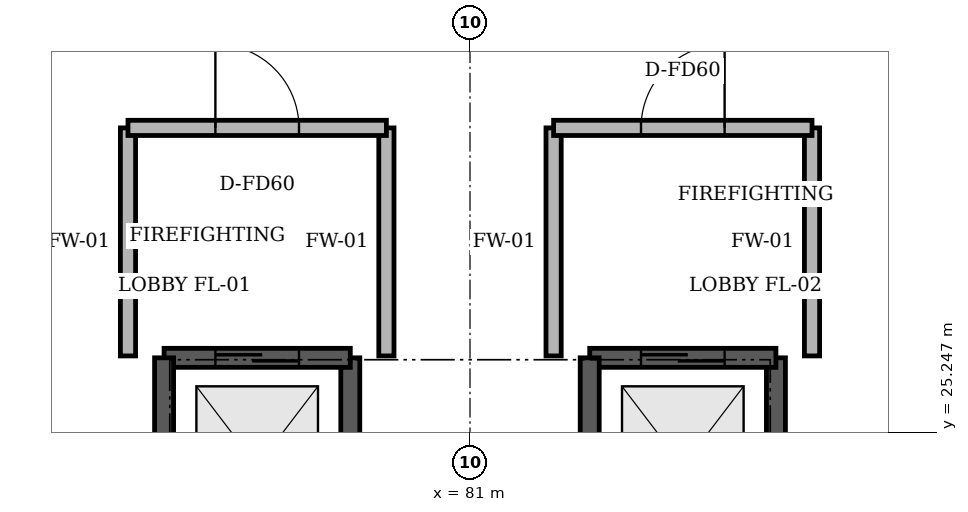
"""IFC4 building model, lengths in metres.
Left out: names, types, materials, properties, quantities, classifications, styles, units other than length and angle.
Written with IfcOpenShell. Run it as: python <this file> out.ifc"""

import sys

from ifc_helpers import new_model, si_unit, direction, frame, frame_2d, origin, place, context, subcontext, project, spatial, rectangle, extrude, element, fill, save


model = new_model("IFC4")
c1 = context("Model", 3, precision=1e-05, world=origin(), true_north=direction((0.0, 1.0)))
c2 = subcontext(c1, "Body", "Model", "MODEL_VIEW")
j1 = project(units=[si_unit("LENGTHUNIT", "METRE"), si_unit("PLANEANGLEUNIT", "RADIAN")], contexts=[c1])
p1 = place(None, origin())
s1 = spatial("IfcSite", under=j1, at=p1, CompositionType="ELEMENT")
p2 = place(p1, origin())
s2 = spatial("IfcBuilding", under=s1, at=p2, CompositionType="ELEMENT")
p3 = place(p2, frame((0.0, 0.0, -4.8)))
s3 = spatial("IfcBuildingStorey", under=s2, at=p3, CompositionType="ELEMENT", Elevation=-4.8)
p4 = place(p3, frame((79.425, 23.375, -0.35), z_axis=(0.0, 0.0, 1.0), x_axis=(0.0, 1.0, 0.0)))
e1 = element("IfcWall", 1, at=p4, inside=s3, PredefinedType="SOLIDWALL", context=c2, shape_type="SweptSolid", body=[
    extrude(rectangle(XDim=2.85, YDim=0.25, at=frame_2d((1.425, 0.0))), origin(), (0.0, 0.0, 1.0), 5.15),
])
p5 = place(p3, frame((79.425, 26.225, -0.35), z_axis=(0.0, 0.0, 1.0), x_axis=(-1.0, 0.0, 0.0)))
e2 = element("IfcWall", 2, at=p5, inside=s3, PredefinedType="SOLIDWALL", context=c2, shape_type="SweptSolid", body=[
    extrude(rectangle(XDim=2.45, YDim=0.25, at=frame_2d((1.225, 0.0))), origin(), (0.0, 0.0, 1.0), 5.15),
])
p6 = place(p5, frame((0.675, 0.0, 0.35)))
e3 = element("IfcOpeningElement", 3, at=p6, cuts=e2, PredefinedType="OPENING", context=c2, shape_type="SweptSolid", body=[
    extrude(rectangle(XDim=1.1, YDim=2.2, at=frame_2d((0.55, 1.1))), frame((0.0, 0.135, 0.0), z_axis=(0.0, -1.0, 0.0), x_axis=(1.0, 0.0, 0.0)), (0.0, 0.0, 1.0), 0.27),
])
p7 = place(p3, frame((76.975, 26.225, -0.35), z_axis=(0.0, 0.0, 1.0), x_axis=(0.0, -1.0, 0.0)))
e4 = element("IfcWall", 4, at=p7, inside=s3, PredefinedType="SOLIDWALL", context=c2, shape_type="SweptSolid", body=[
    extrude(rectangle(XDim=2.85, YDim=0.25, at=frame_2d((1.425, 0.0))), origin(), (0.0, 0.0, 1.0), 5.15),
])
p8 = place(p3, frame((76.5, 26.25, 0.0), z_axis=(0.0, 0.0, 1.0), x_axis=(0.0, 1.0, 0.0)))
e5 = element("IfcWall", 5, at=p8, inside=s3, PredefinedType="SOLIDWALL", context=c2, shape_type="SweptSolid", body=[
    extrude(rectangle(XDim=3.0, YDim=0.2, at=frame_2d((1.5, 0.0))), origin(), (0.0, 0.0, 1.0), 3.564),
])
p9 = place(p3, frame((79.9, 26.25, 0.0), z_axis=(0.0, 0.0, 1.0), x_axis=(0.0, 1.0, 0.0)))
e6 = element("IfcWall", 6, at=p9, inside=s3, PredefinedType="SOLIDWALL", context=c2, shape_type="SweptSolid", body=[
    extrude(rectangle(XDim=3.0, YDim=0.2, at=frame_2d((1.5, 0.0))), origin(), (0.0, 0.0, 1.0), 3.97),
])
p10 = place(p3, frame((76.5, 29.25, 0.0), z_axis=(0.0, 0.0, 1.0), x_axis=(1.0, 0.0, 0.0)))
e7 = element("IfcWall", 7, at=p10, inside=s3, PredefinedType="SOLIDWALL", context=c2, shape_type="SweptSolid", body=[
    extrude(rectangle(XDim=3.4, YDim=0.2, at=frame_2d((1.7, 0.0))), origin(), (0.0, 0.0, 1.0), 3.564),
])
p11 = place(p10, frame((1.15, 0.0, 0.0)))
e8 = element("IfcOpeningElement", 8, at=p11, cuts=e7, PredefinedType="OPENING", context=c2, shape_type="SweptSolid", body=[
    extrude(rectangle(XDim=1.1, YDim=2.2, at=frame_2d((0.55, 1.1))), frame((0.0, 0.11, 0.0), z_axis=(0.0, -1.0, 0.0), x_axis=(1.0, 0.0, 0.0)), (0.0, 0.0, 1.0), 0.22),
])
p12 = place(p3, frame((85.025, 23.375, -0.35), z_axis=(0.0, 0.0, 1.0), x_axis=(0.0, 1.0, 0.0)))
e9 = element("IfcWall", 9, at=p12, inside=s3, PredefinedType="SOLIDWALL", context=c2, shape_type="SweptSolid", body=[
    extrude(rectangle(XDim=2.85, YDim=0.25, at=frame_2d((1.425, 0.0))), origin(), (0.0, 0.0, 1.0), 5.15),
])
p13 = place(p3, frame((85.025, 26.225, -0.35), z_axis=(0.0, 0.0, 1.0), x_axis=(-1.0, 0.0, 0.0)))
e10 = element("IfcWall", 10, at=p13, inside=s3, PredefinedType="SOLIDWALL", context=c2, shape_type="SweptSolid", body=[
    extrude(rectangle(XDim=2.45, YDim=0.25, at=frame_2d((1.225, 0.0))), origin(), (0.0, 0.0, 1.0), 5.15),
])
p14 = place(p13, frame((0.675, 0.0, 0.35)))
e11 = element("IfcOpeningElement", 11, at=p14, cuts=e10, PredefinedType="OPENING", context=c2, shape_type="SweptSolid", body=[
    extrude(rectangle(XDim=1.1, YDim=2.2, at=frame_2d((0.55, 1.1))), frame((0.0, 0.135, 0.0), z_axis=(0.0, -1.0, 0.0), x_axis=(1.0, 0.0, 0.0)), (0.0, 0.0, 1.0), 0.27),
])
p15 = place(p3, frame((82.575, 26.225, -0.35), z_axis=(0.0, 0.0, 1.0), x_axis=(0.0, -1.0, 0.0)))
e12 = element("IfcWall", 12, at=p15, inside=s3, PredefinedType="SOLIDWALL", context=c2, shape_type="SweptSolid", body=[
    extrude(rectangle(XDim=2.85, YDim=0.25, at=frame_2d((1.425, 0.0))), origin(), (0.0, 0.0, 1.0), 5.15),
])
p16 = place(p3, frame((82.1, 26.25, 0.0), z_axis=(0.0, 0.0, 1.0), x_axis=(0.0, 1.0, 0.0)))
e13 = element("IfcWall", 13, at=p16, inside=s3, PredefinedType="SOLIDWALL", context=c2, shape_type="SweptSolid", body=[
    extrude(rectangle(XDim=3.0, YDim=0.2, at=frame_2d((1.5, 0.0))), origin(), (0.0, 0.0, 1.0), 3.97),
])
p17 = place(p3, frame((85.5, 26.25, 0.0), z_axis=(0.0, 0.0, 1.0), x_axis=(0.0, 1.0, 0.0)))
e14 = element("IfcWall", 14, at=p17, inside=s3, PredefinedType="SOLIDWALL", context=c2, shape_type="SweptSolid", body=[
    extrude(rectangle(XDim=3.0, YDim=0.2, at=frame_2d((1.5, 0.0))), origin(), (0.0, 0.0, 1.0), 3.566),
])
p18 = place(p3, frame((82.1, 29.25, 0.0), z_axis=(0.0, 0.0, 1.0), x_axis=(1.0, 0.0, 0.0)))
e15 = element("IfcWall", 15, at=p18, inside=s3, PredefinedType="SOLIDWALL", context=c2, shape_type="SweptSolid", body=[
    extrude(rectangle(XDim=3.4, YDim=0.2, at=frame_2d((1.7, 0.0))), origin(), (0.0, 0.0, 1.0), 3.566),
])
p19 = place(p18, frame((1.15, 0.0, 0.0)))
e16 = element("IfcOpeningElement", 16, at=p19, cuts=e15, PredefinedType="OPENING", context=c2, shape_type="SweptSolid", body=[
    extrude(rectangle(XDim=1.1, YDim=2.2, at=frame_2d((0.55, 1.1))), frame((0.0, 0.11, 0.0), z_axis=(0.0, -1.0, 0.0), x_axis=(1.0, 0.0, 0.0)), (0.0, 0.0, 1.0), 0.22),
])
p20 = place(p6, origin())
e17 = element("IfcDoor", 17, at=p20, inside=s3, OperationType="SLIDING_TO_LEFT", PredefinedType="DOOR", context=c2, shape_type="SweptSolid", body=[
    extrude(rectangle(XDim=1.1, YDim=2.2, at=frame_2d((0.55, 1.1))), frame((0.0, 0.025, 0.0), z_axis=(0.0, -1.0, 0.0), x_axis=(1.0, 0.0, 0.0)), (0.0, 0.0, 1.0), 0.05),
])
fill(e3, e17)
p21 = place(p11, origin())
e18 = element("IfcDoor", 18, at=p21, inside=s3, OperationType="SINGLE_SWING_LEFT", PredefinedType="DOOR", context=c2, shape_type="SweptSolid", body=[
    extrude(rectangle(XDim=1.1, YDim=2.2, at=frame_2d((0.55, 1.1))), frame((0.0, 0.025, 0.0), z_axis=(0.0, -1.0, 0.0), x_axis=(1.0, 0.0, 0.0)), (0.0, 0.0, 1.0), 0.05),
])
fill(e8, e18)
p22 = place(p14, origin())
e19 = element("IfcDoor", 19, at=p22, inside=s3, OperationType="SLIDING_TO_LEFT", PredefinedType="DOOR", context=c2, shape_type="SweptSolid", body=[
    extrude(rectangle(XDim=1.1, YDim=2.2, at=frame_2d((0.55, 1.1))), frame((0.0, 0.025, 0.0), z_axis=(0.0, -1.0, 0.0), x_axis=(1.0, 0.0, 0.0)), (0.0, 0.0, 1.0), 0.05),
])
fill(e11, e19)
p23 = place(p19, origin())
e20 = element("IfcDoor", 20, at=p23, inside=s3, OperationType="SINGLE_SWING_RIGHT", PredefinedType="DOOR", context=c2, shape_type="SweptSolid", body=[
    extrude(rectangle(XDim=1.1, YDim=2.2, at=frame_2d((0.55, 1.1))), frame((0.0, 0.025, 0.0), z_axis=(0.0, -1.0, 0.0), x_axis=(1.0, 0.0, 0.0)), (0.0, 0.0, 1.0), 0.05),
])
fill(e16, e20)
save(model, sys.argv[1])
